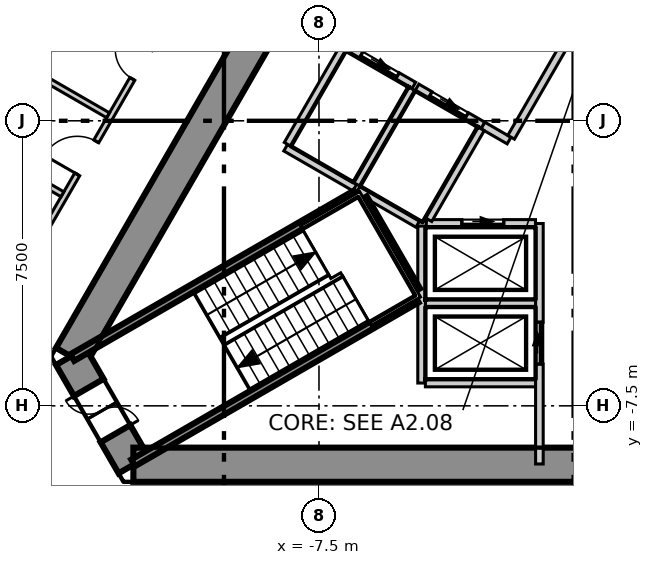
"""IFC4 building model, lengths in metres.
Left out: names, types, materials, properties, quantities, classifications, styles, units other than length and angle.
Written with IfcOpenShell. Run it as: python <this file> out.ifc"""

import sys

from ifc_helpers import new_model, si_unit, direction, frame, frame_2d, origin, place, context, subcontext, project, spatial, polyline, rectangle, outline, extrude, element, fill, save


model = new_model("IFC4")
c1 = context("Model", 3, precision=1e-05, world=origin(), true_north=direction((0.0, 1.0)))
c2 = subcontext(c1, "Body", "Model", "MODEL_VIEW")
j1 = project(units=[si_unit("LENGTHUNIT", "METRE"), si_unit("PLANEANGLEUNIT", "RADIAN")], contexts=[c1])
p1 = place(None, origin())
s1 = spatial("IfcSite", under=j1, at=p1, CompositionType="ELEMENT")
p2 = place(p1, origin())
s2 = spatial("IfcBuilding", under=s1, at=p2, CompositionType="ELEMENT")
p3 = place(p2, frame((0.0, 0.0, 35.3)))
s3 = spatial("IfcBuildingStorey", under=s2, at=p3, CompositionType="ELEMENT", Elevation=35.3)
p4 = place(p3, frame((-1.645, 15.25, -0.3), z_axis=(0.0, 0.0, 1.0), x_axis=(-0.500026485275, -0.866010111964, 0.0)))
e1 = element("IfcWall", 1, at=p4, inside=s3, PredefinedType="SHEAR", context=c2, shape_type="SweptSolid", body=[
    extrude(outline(polyline([(-0.26, -0.45), (1.685, -0.45), (3.63, -0.45), (5.576, -0.45), (7.521, -0.45), (9.466, -0.449), (11.411, -0.449), (13.357, -0.449), (15.302, -0.449), (17.247, -0.449), (19.192, -0.449), (21.138, -0.449), (23.083, -0.449), (25.028, -0.449), (24.509, 0.45), (22.644, 0.45), (20.778, 0.45), (18.913, 0.45), (17.048, 0.45), (15.182, 0.449), (13.317, 0.449), (11.452, 0.449), (9.587, 0.449), (7.721, 0.449), (5.856, 0.449), (3.991, 0.449), (2.125, 0.449), (0.26, 0.449), (-0.26, -0.45)])), origin(), (0.0, 0.0, 1.0), 4.0),
])
p5 = place(p4, frame((11.834, 0.0, 0.3)))
e2 = element("IfcOpeningElement", 2, at=p5, cuts=e1, PredefinedType="OPENING", context=c2, shape_type="SweptSolid", body=[
    extrude(rectangle(XDim=1.1, YDim=2.1, at=frame_2d((0.55, 1.05))), frame((0.0, 0.46, 0.0), z_axis=(0.0, -1.0, 0.0), x_axis=(1.0, 0.0, 0.0)), (0.0, 0.0, 1.0), 0.92),
])
p6 = place(p4, frame((4.842, 0.0, 0.3)))
e3 = element("IfcOpeningElement", 3, at=p6, cuts=e1, PredefinedType="OPENING", context=c2, shape_type="SweptSolid", body=[
    extrude(rectangle(XDim=1.0, YDim=2.1, at=frame_2d((0.5, 1.05))), frame((0.0, 0.46, 0.0), z_axis=(0.0, -1.0, 0.0), x_axis=(1.0, 0.0, 0.0)), (0.0, 0.0, 1.0), 0.92),
])
p7 = place(p3, frame((-14.03, -6.2, -0.3), z_axis=(0.0, 0.0, 1.0), x_axis=(0.500111984565, -0.865960739811, 0.0)))
e4 = element("IfcWall", 4, at=p7, inside=s3, PredefinedType="SHEAR", context=c2, shape_type="SweptSolid", body=[
    extrude(outline(polyline([(-0.26, -0.449), (1.646, -0.449), (3.551, -0.45), (3.032, 0.45), (1.646, 0.45), (0.26, 0.45), (-0.26, -0.449)])), origin(), (0.0, 0.0, 1.0), 4.0),
])
p8 = place(p7, frame((0.946, 0.0, 0.3)))
e5 = element("IfcOpeningElement", 5, at=p8, cuts=e4, PredefinedType="OPENING", context=c2, shape_type="SweptSolid", body=[
    extrude(rectangle(XDim=1.4, YDim=2.1, at=frame_2d((0.7, 1.05))), frame((0.0, 0.46, 0.0), z_axis=(0.0, -1.0, 0.0), x_axis=(1.0, 0.0, 0.0)), (0.0, 0.0, 1.0), 0.92),
])
p9 = place(p3, frame((-12.384, -9.05, -0.3), z_axis=(0.0, 0.0, 1.0), x_axis=(1.0, 0.0, 0.0)))
e6 = element("IfcWall", 6, at=p9, inside=s3, PredefinedType="SHEAR", context=c2, shape_type="SweptSolid", body=[
    extrude(outline(polyline([(-0.26, -0.45), (1.685, -0.45), (3.63, -0.45), (5.576, -0.45), (7.521, -0.45), (9.466, -0.45), (11.411, -0.45), (13.357, -0.45), (15.302, -0.45), (17.247, -0.45), (19.192, -0.45), (21.138, -0.45), (23.083, -0.45), (25.028, -0.45), (24.508, 0.45), (22.643, 0.45), (20.778, 0.45), (18.912, 0.45), (17.047, 0.45), (15.182, 0.45), (13.317, 0.45), (11.451, 0.45), (9.586, 0.45), (7.721, 0.45), (5.856, 0.45), (3.99, 0.45), (2.125, 0.45), (0.26, 0.45), (-0.26, -0.45)])), origin(), (0.0, 0.0, 1.0), 4.0),
])
p10 = place(p9, frame((16.648, 0.0, 0.3)))
e7 = element("IfcOpeningElement", 7, at=p10, cuts=e6, PredefinedType="OPENING", context=c2, shape_type="SweptSolid", body=[
    extrude(rectangle(XDim=0.9, YDim=2.1, at=frame_2d((0.45, 1.05))), frame((0.0, 0.46, 0.0), z_axis=(0.0, -1.0, 0.0), x_axis=(1.0, 0.0, 0.0)), (0.0, 0.0, 1.0), 0.92),
])
p11 = place(p3, frame((-3.462, 38.603, 0.0), z_axis=(0.0, 0.0, 1.0), x_axis=(-0.500012207976, -0.866018355391, 0.0)))
e8 = element("IfcWall", 8, at=p11, inside=s3, PredefinedType="ELEMENTEDWALL", context=c2, shape_type="SweptSolid", body=[
    extrude(rectangle(XDim=63.381, YDim=0.2, at=frame_2d((31.69, 0.0))), origin(), (0.0, 0.0, 1.0), 3.7),
])
p12 = place(p11, frame((2.302, 0.0, 0.9)))
e9 = element("IfcOpeningElement", 9, at=p12, cuts=e8, PredefinedType="OPENING", context=c2, shape_type="SweptSolid", body=[
    extrude(rectangle(XDim=5.6, YDim=2.5, at=frame_2d((2.8, 1.25))), frame((0.0, 0.11, 0.0), z_axis=(0.0, -1.0, 0.0), x_axis=(1.0, 0.0, 0.0)), (0.0, 0.0, 1.0), 0.22),
])
p13 = place(p11, frame((9.902, 0.0, 0.9)))
e10 = element("IfcOpeningElement", 10, at=p13, cuts=e8, PredefinedType="OPENING", context=c2, shape_type="SweptSolid", body=[
    extrude(rectangle(XDim=5.6, YDim=2.5, at=frame_2d((2.8, 1.25))), frame((0.0, 0.11, 0.0), z_axis=(0.0, -1.0, 0.0), x_axis=(1.0, 0.0, 0.0)), (0.0, 0.0, 1.0), 0.22),
])
p14 = place(p11, frame((17.501, 0.0, 0.9)))
e11 = element("IfcOpeningElement", 11, at=p14, cuts=e8, PredefinedType="OPENING", context=c2, shape_type="SweptSolid", body=[
    extrude(rectangle(XDim=5.6, YDim=2.5, at=frame_2d((2.8, 1.25))), frame((0.0, 0.11, 0.0), z_axis=(0.0, -1.0, 0.0), x_axis=(1.0, 0.0, 0.0)), (0.0, 0.0, 1.0), 0.22),
])
p15 = place(p11, frame((25.1, 0.0, 0.9)))
e12 = element("IfcOpeningElement", 12, at=p15, cuts=e8, PredefinedType="OPENING", context=c2, shape_type="SweptSolid", body=[
    extrude(rectangle(XDim=5.6, YDim=2.5, at=frame_2d((2.8, 1.25))), frame((0.0, 0.11, 0.0), z_axis=(0.0, -1.0, 0.0), x_axis=(1.0, 0.0, 0.0)), (0.0, 0.0, 1.0), 0.22),
])
p16 = place(p11, frame((32.7, 0.0, 0.9)))
e13 = element("IfcOpeningElement", 13, at=p16, cuts=e8, PredefinedType="OPENING", context=c2, shape_type="SweptSolid", body=[
    extrude(rectangle(XDim=5.6, YDim=2.5, at=frame_2d((2.8, 1.25))), frame((0.0, 0.11, 0.0), z_axis=(0.0, -1.0, 0.0), x_axis=(1.0, 0.0, 0.0)), (0.0, 0.0, 1.0), 0.22),
])
p17 = place(p11, frame((40.299, 0.0, 0.9)))
e14 = element("IfcOpeningElement", 14, at=p17, cuts=e8, PredefinedType="OPENING", context=c2, shape_type="SweptSolid", body=[
    extrude(rectangle(XDim=5.6, YDim=2.5, at=frame_2d((2.8, 1.25))), frame((0.0, 0.11, 0.0), z_axis=(0.0, -1.0, 0.0), x_axis=(1.0, 0.0, 0.0)), (0.0, 0.0, 1.0), 0.22),
])
p18 = place(p11, frame((47.899, 0.0, 0.9)))
e15 = element("IfcOpeningElement", 15, at=p18, cuts=e8, PredefinedType="OPENING", context=c2, shape_type="SweptSolid", body=[
    extrude(rectangle(XDim=5.6, YDim=2.5, at=frame_2d((2.8, 1.25))), frame((0.0, 0.11, 0.0), z_axis=(0.0, -1.0, 0.0), x_axis=(1.0, 0.0, 0.0)), (0.0, 0.0, 1.0), 0.22),
])
p19 = place(p11, frame((55.498, 0.0, 0.9)))
e16 = element("IfcOpeningElement", 16, at=p19, cuts=e8, PredefinedType="OPENING", context=c2, shape_type="SweptSolid", body=[
    extrude(rectangle(XDim=5.6, YDim=2.5, at=frame_2d((2.8, 1.25))), frame((0.0, 0.11, 0.0), z_axis=(0.0, -1.0, 0.0), x_axis=(1.0, 0.0, 0.0)), (0.0, 0.0, 1.0), 0.22),
])
p20 = place(p3, frame((-19.497, -11.17, 0.0), z_axis=(0.0, 0.0, 1.0), x_axis=(0.499998854553, 0.866026065108, 0.0)))
e17 = element("IfcWall", 17, at=p20, inside=s3, PredefinedType="PARTITIONING", context=c2, shape_type="SweptSolid", body=[
    extrude(rectangle(XDim=38.994, YDim=0.15, at=frame_2d((19.497, 0.0))), origin(), (0.0, 0.0, 1.0), 3.7),
])
p21 = place(p20, frame((36.244, 0.0, 0.0)))
e18 = element("IfcOpeningElement", 18, at=p21, cuts=e17, PredefinedType="OPENING", context=c2, shape_type="SweptSolid", body=[
    extrude(rectangle(XDim=1.1, YDim=2.1, at=frame_2d((0.55, 1.05))), frame((0.0, 0.085, 0.0), z_axis=(0.0, -1.0, 0.0), x_axis=(1.0, 0.0, 0.0)), (0.0, 0.0, 1.0), 0.17),
])
p22 = place(p20, frame((29.171, 0.0, 0.0)))
e19 = element("IfcOpeningElement", 19, at=p22, cuts=e17, PredefinedType="OPENING", context=c2, shape_type="SweptSolid", body=[
    extrude(rectangle(XDim=1.0, YDim=2.1, at=frame_2d((0.5, 1.05))), frame((0.0, 0.085, 0.0), z_axis=(0.0, -1.0, 0.0), x_axis=(1.0, 0.0, 0.0)), (0.0, 0.0, 1.0), 0.17),
])
p23 = place(p20, frame((32.971, 0.0, 0.0)))
e20 = element("IfcOpeningElement", 20, at=p23, cuts=e17, PredefinedType="OPENING", context=c2, shape_type="SweptSolid", body=[
    extrude(rectangle(XDim=0.9, YDim=2.1, at=frame_2d((0.45, 1.05))), frame((0.0, 0.085, 0.0), z_axis=(0.0, -1.0, 0.0), x_axis=(1.0, 0.0, 0.0)), (0.0, 0.0, 1.0), 0.17),
])
p24 = place(p20, frame((22.771, 0.0, 0.0)))
e21 = element("IfcOpeningElement", 21, at=p24, cuts=e17, PredefinedType="OPENING", context=c2, shape_type="SweptSolid", body=[
    extrude(rectangle(XDim=1.0, YDim=2.1, at=frame_2d((0.5, 1.05))), frame((0.0, 0.085, 0.0), z_axis=(0.0, -1.0, 0.0), x_axis=(1.0, 0.0, 0.0)), (0.0, 0.0, 1.0), 0.17),
])
p25 = place(p20, frame((6.872, 0.0, 0.0)))
e22 = element("IfcOpeningElement", 22, at=p25, cuts=e17, PredefinedType="OPENING", context=c2, shape_type="SweptSolid", body=[
    extrude(rectangle(XDim=1.1, YDim=2.1, at=frame_2d((0.55, 1.05))), frame((0.0, 0.085, 0.0), z_axis=(0.0, -1.0, 0.0), x_axis=(1.0, 0.0, 0.0)), (0.0, 0.0, 1.0), 0.17),
])
p26 = place(p20, frame((17.372, 0.0, 0.0)))
e23 = element("IfcOpeningElement", 23, at=p26, cuts=e17, PredefinedType="OPENING", context=c2, shape_type="SweptSolid", body=[
    extrude(rectangle(XDim=0.9, YDim=2.1, at=frame_2d((0.45, 1.05))), frame((0.0, 0.085, 0.0), z_axis=(0.0, -1.0, 0.0), x_axis=(1.0, 0.0, 0.0)), (0.0, 0.0, 1.0), 0.17),
])
p27 = place(p20, frame((14.172, 0.0, 0.0)))
e24 = element("IfcOpeningElement", 24, at=p27, cuts=e17, PredefinedType="OPENING", context=c2, shape_type="SweptSolid", body=[
    extrude(rectangle(XDim=0.9, YDim=2.1, at=frame_2d((0.45, 1.05))), frame((0.0, 0.085, 0.0), z_axis=(0.0, -1.0, 0.0), x_axis=(1.0, 0.0, 0.0)), (0.0, 0.0, 1.0), 0.17),
])
p28 = place(p20, frame((11.272, 0.0, 0.0)))
e25 = element("IfcOpeningElement", 25, at=p28, cuts=e17, PredefinedType="OPENING", context=c2, shape_type="SweptSolid", body=[
    extrude(rectangle(XDim=1.0, YDim=2.1, at=frame_2d((0.5, 1.05))), frame((0.0, 0.085, 0.0), z_axis=(0.0, -1.0, 0.0), x_axis=(1.0, 0.0, 0.0)), (0.0, 0.0, 1.0), 0.17),
])
p29 = place(p20, frame((1.473, 0.0, 0.0)))
e26 = element("IfcOpeningElement", 26, at=p29, cuts=e17, PredefinedType="OPENING", context=c2, shape_type="SweptSolid", body=[
    extrude(rectangle(XDim=1.1, YDim=2.1, at=frame_2d((0.55, 1.05))), frame((0.0, 0.085, 0.0), z_axis=(0.0, -1.0, 0.0), x_axis=(1.0, 0.0, 0.0)), (0.0, 0.0, 1.0), 0.17),
])
p30 = place(p3, frame((-17.304, -0.171, 0.0), z_axis=(0.0, 0.0, 1.0), x_axis=(0.500054279689, 0.865994063124, 0.0)))
e27 = element("IfcWall", 27, at=p30, inside=s3, PredefinedType="PARTITIONING", context=c2, shape_type="SweptSolid", body=[
    extrude(rectangle(XDim=8.725, YDim=0.15, at=frame_2d((4.363, 0.0))), origin(), (0.0, 0.0, 1.0), 3.7),
])
for number, where, z_axis, x_axis in (
    (28, (-17.239, -0.208, 0.0), (0.0, 0.0, 1.0), (0.866, -0.5, 0.0)),
    (29, (-16.039, 1.87, 0.0), (0.0, 0.0, 1.0), (0.866, -0.5, 0.0)),
):
    element("IfcWall", number, at=place(p3, frame(where, z_axis=z_axis, x_axis=x_axis)), inside=s3, PredefinedType="PARTITIONING", context=c2, shape_type="SweptSolid", body=[
        extrude(rectangle(XDim=3.45, YDim=0.15, at=frame_2d((1.725, 0.0))), origin(), (0.0, 0.0, 1.0), 3.7),
    ])
p31 = place(p3, frame((-8.376, -0.707, 0.0), z_axis=(0.0, 0.0, 1.0), x_axis=(0.866067520717, -0.499927044236, 0.0)))
e30 = element("IfcWall", 30, at=p31, inside=s3, PredefinedType="SOLIDWALL", context=c2, shape_type="SweptSolid", body=[
    extrude(rectangle(XDim=2.1, YDim=0.2, at=frame_2d((1.05, 0.0))), origin(), (0.0, 0.0, 1.0), 3.7),
])
p32 = place(p3, frame((-8.326, -0.62, 0.0), z_axis=(0.0, 0.0, 1.0), x_axis=(0.500023687443, 0.866011727401, 0.0)))
e31 = element("IfcWall", 31, at=p32, inside=s3, PredefinedType="SOLIDWALL", context=c2, shape_type="SweptSolid", body=[
    extrude(rectangle(XDim=2.9, YDim=0.2, at=frame_2d((1.45, 0.0))), origin(), (0.0, 0.0, 1.0), 3.7),
])
p33 = place(p3, frame((-4.7, -4.8, 0.0), z_axis=(0.0, 0.0, 1.0), x_axis=(1.0, 0.0, 0.0)))
e32 = element("IfcWall", 32, at=p33, inside=s3, PredefinedType="SOLIDWALL", context=c2, shape_type="SweptSolid", body=[
    extrude(rectangle(XDim=2.9, YDim=0.2, at=frame_2d((1.45, 0.0))), origin(), (0.0, 0.0, 1.0), 3.7),
])
p34 = place(p3, frame((-4.8, -6.9, 0.0), z_axis=(0.0, 0.0, 1.0), x_axis=(0.0, 1.0, 0.0)))
e33 = element("IfcWall", 33, at=p34, inside=s3, PredefinedType="SOLIDWALL", context=c2, shape_type="SweptSolid", body=[
    extrude(rectangle(XDim=4.131, YDim=0.2, at=frame_2d((2.065, 0.0))), origin(), (0.0, 0.0, 1.0), 3.7),
])
p35 = place(p3, frame((-4.7, -6.9, 0.0), z_axis=(0.0, 0.0, 1.0), x_axis=(1.0, 0.0, 0.0)))
e34 = element("IfcWall", 34, at=p35, inside=s3, PredefinedType="SOLIDWALL", context=c2, shape_type="SweptSolid", body=[
    extrude(rectangle(XDim=2.9, YDim=0.2, at=frame_2d((1.45, 0.0))), origin(), (0.0, 0.0, 1.0), 3.7),
])
p36 = place(p3, frame((-1.7, -9.03, 0.0), z_axis=(0.0, 0.0, 1.0), x_axis=(0.0, 1.0, 0.0)))
e35 = element("IfcWall", 35, at=p36, inside=s3, PredefinedType="SOLIDWALL", context=c2, shape_type="SweptSolid", body=[
    extrude(rectangle(XDim=6.327, YDim=0.2, at=frame_2d((3.164, 0.0))), origin(), (0.0, 0.0, 1.0), 3.7),
])
p37 = place(p36, frame((2.63, 0.0, 0.0)))
e36 = element("IfcOpeningElement", 36, at=p37, cuts=e35, PredefinedType="OPENING", context=c2, shape_type="SweptSolid", body=[
    extrude(rectangle(XDim=1.1, YDim=2.1, at=frame_2d((0.55, 1.05))), frame((0.0, 0.11, 0.0), z_axis=(0.0, -1.0, 0.0), x_axis=(1.0, 0.0, 0.0)), (0.0, 0.0, 1.0), 0.22),
])
p38 = place(p3, frame((-4.676, -2.7, 0.0), z_axis=(0.0, 0.0, 1.0), x_axis=(1.0, 0.0, 0.0)))
e37 = element("IfcWall", 37, at=p38, inside=s3, PredefinedType="SOLIDWALL", context=c2, shape_type="SweptSolid", body=[
    extrude(rectangle(XDim=2.873, YDim=0.2, at=frame_2d((1.437, 0.0))), origin(), (0.0, 0.0, 1.0), 3.7),
])
p39 = place(p38, frame((0.937, 0.0, 0.0)))
e38 = element("IfcOpeningElement", 38, at=p39, cuts=e37, PredefinedType="OPENING", context=c2, shape_type="SweptSolid", body=[
    extrude(rectangle(XDim=1.1, YDim=2.1, at=frame_2d((0.55, 1.05))), frame((0.0, 0.11, 0.0), z_axis=(0.0, -1.0, 0.0), x_axis=(1.0, 0.0, 0.0)), (0.0, 0.0, 1.0), 0.22),
])
p40 = place(p3, frame((-8.67, 3.043, 0.0), z_axis=(0.0, 0.0, 1.0), x_axis=(0.866029956157, -0.499992114976, 0.0)))
e39 = element("IfcWall", 39, at=p40, inside=s3, PredefinedType="SOLIDWALL", context=c2, shape_type="SweptSolid", body=[
    extrude(rectangle(XDim=4.232, YDim=0.2, at=frame_2d((2.116, 0.0))), origin(), (0.0, 0.0, 1.0), 3.7),
])
p41 = place(p40, frame((2.63, 0.0, 0.0)))
e40 = element("IfcOpeningElement", 40, at=p41, cuts=e39, PredefinedType="OPENING", context=c2, shape_type="SweptSolid", body=[
    extrude(rectangle(XDim=1.1, YDim=2.1, at=frame_2d((0.55, 1.05))), frame((0.0, 0.11, 0.0), z_axis=(0.0, -1.0, 0.0), x_axis=(1.0, 0.0, 0.0)), (0.0, 0.0, 1.0), 0.22),
])
p42 = place(p3, frame((-3.188, -0.122, 0.0), z_axis=(0.0, 0.0, 1.0), x_axis=(0.865705793592, -0.50055317294, 0.0)))
e41 = element("IfcWall", 41, at=p42, inside=s3, PredefinedType="SOLIDWALL", context=c2, shape_type="SweptSolid", body=[
    extrude(rectangle(XDim=0.797, YDim=0.2, at=frame_2d((0.398, 0.0))), origin(), (0.0, 0.0, 1.0), 3.7),
])
p43 = place(p3, frame((-2.444, -0.433, 0.0), z_axis=(0.0, 0.0, 1.0), x_axis=(0.500035624827, 0.866004834804, 0.0)))
e42 = element("IfcWall", 42, at=p43, inside=s3, PredefinedType="SOLIDWALL", context=c2, shape_type="SweptSolid", body=[
    extrude(rectangle(XDim=3.194, YDim=0.2, at=frame_2d((1.597, 0.0))), origin(), (0.0, 0.0, 1.0), 3.7),
])
p44 = place(p3, frame((-6.507, -1.67, 0.0), z_axis=(0.0, 0.0, 1.0), x_axis=(0.50012328804, 0.865954211699, 0.0)))
e43 = element("IfcWall", 43, at=p44, inside=s3, PredefinedType="SOLIDWALL", context=c2, shape_type="SweptSolid", body=[
    extrude(rectangle(XDim=2.9, YDim=0.2, at=frame_2d((1.45, 0.0))), origin(), (0.0, 0.0, 1.0), 3.7),
])
p45 = place(p3, frame((-6.47, -1.807, 0.0), z_axis=(0.0, 0.0, 1.0), x_axis=(0.865883195159, -0.500246231712, 0.0)))
e44 = element("IfcWall", 44, at=p45, inside=s3, PredefinedType="SOLIDWALL", context=c2, shape_type="SweptSolid", body=[
    extrude(rectangle(XDim=1.815, YDim=0.2, at=frame_2d((0.908, 0.0))), origin(), (0.0, 0.0, 1.0), 3.7),
])
p46 = place(p3, frame((-4.922, 0.879, 0.0), z_axis=(0.0, 0.0, 1.0), x_axis=(0.866073918653, -0.499915960366, 0.0)))
e45 = element("IfcWall", 45, at=p46, inside=s3, PredefinedType="SOLIDWALL", context=c2, shape_type="SweptSolid", body=[
    extrude(rectangle(XDim=2.002, YDim=0.2, at=frame_2d((1.001, 0.0))), origin(), (0.0, 0.0, 1.0), 3.7),
])
p47 = place(p46, frame((0.402, 0.0, 0.0)))
e46 = element("IfcOpeningElement", 46, at=p47, cuts=e45, PredefinedType="OPENING", context=c2, shape_type="SweptSolid", body=[
    extrude(rectangle(XDim=1.1, YDim=2.1, at=frame_2d((0.55, 1.05))), frame((0.0, 0.11, 0.0), z_axis=(0.0, -1.0, 0.0), x_axis=(1.0, 0.0, 0.0)), (0.0, 0.0, 1.0), 0.22),
])
p48 = place(p3, frame((-4.619, -2.6, 0.0), z_axis=(0.0, 0.0, 1.0), x_axis=(0.50009492287, 0.865970593103, 0.0)))
e47 = element("IfcWall", 47, at=p48, inside=s3, PredefinedType="SOLIDWALL", context=c2, shape_type="SweptSolid", body=[
    extrude(rectangle(XDim=2.761, YDim=0.2, at=frame_2d((1.381, 0.0))), origin(), (0.0, 0.0, 1.0), 3.7),
])
p49 = place(p3, frame((-13.99, -6.229, 0.0), z_axis=(0.0, 0.0, 1.0), x_axis=(0.866060059011, 0.499939970583, 0.0)))
e48 = element("IfcWall", 48, at=p49, inside=s3, PredefinedType="SOLIDWALL", context=c2, shape_type="SweptSolid", body=[
    extrude(rectangle(XDim=8.615, YDim=0.2, at=frame_2d((4.307, 0.0))), origin(), (0.0, 0.0, 1.0), 3.7),
])
p50 = place(p3, frame((-6.329, -2.038, 0.0), z_axis=(0.0, 0.0, 1.0), x_axis=(0.500200581029, -0.865909567298, 0.0)))
e49 = element("IfcWall", 49, at=p50, inside=s3, PredefinedType="SOLIDWALL", context=c2, shape_type="SweptSolid", body=[
    extrude(rectangle(XDim=2.799, YDim=0.2, at=frame_2d((1.399, 0.0))), origin(), (0.0, 0.0, 1.0), 3.7),
])
p51 = place(p3, frame((-12.39, -9.001, 0.0), z_axis=(0.0, 0.0, 1.0), x_axis=(0.866010975815, 0.500024989144, 0.0)))
e50 = element("IfcWall", 50, at=p51, inside=s3, PredefinedType="SOLIDWALL", context=c2, shape_type="SweptSolid", body=[
    extrude(rectangle(XDim=8.615, YDim=0.2, at=frame_2d((4.308, 0.0))), origin(), (0.0, 0.0, 1.0), 3.7),
])
p52 = place(p39, origin())
e51 = element("IfcDoor", 51, at=p52, inside=s3, OperationType="SLIDING_TO_LEFT", PredefinedType="DOOR", context=c2, shape_type="SweptSolid", body=[
    extrude(rectangle(XDim=1.1, YDim=2.1, at=frame_2d((0.55, 1.05))), frame((0.0, 0.025, 0.0), z_axis=(0.0, -1.0, 0.0), x_axis=(1.0, 0.0, 0.0)), (0.0, 0.0, 1.0), 0.05),
])
fill(e38, e51)
p53 = place(p37, origin())
e52 = element("IfcDoor", 52, at=p53, inside=s3, OperationType="SLIDING_TO_LEFT", PredefinedType="DOOR", context=c2, shape_type="SweptSolid", body=[
    extrude(rectangle(XDim=1.1, YDim=2.1, at=frame_2d((0.55, 1.05))), frame((0.0, 0.025, 0.0), z_axis=(0.0, -1.0, 0.0), x_axis=(1.0, 0.0, 0.0)), (0.0, 0.0, 1.0), 0.05),
])
fill(e36, e52)
p54 = place(p47, origin())
e53 = element("IfcDoor", 53, at=p54, inside=s3, OperationType="SLIDING_TO_LEFT", PredefinedType="DOOR", context=c2, shape_type="SweptSolid", body=[
    extrude(rectangle(XDim=1.1, YDim=2.1, at=frame_2d((0.55, 1.05))), frame((0.0, 0.025, 0.0), z_axis=(0.0, -1.0, 0.0), x_axis=(1.0, 0.0, 0.0)), (0.0, 0.0, 1.0), 0.05),
])
fill(e46, e53)
p55 = place(p41, origin())
e54 = element("IfcDoor", 54, at=p55, inside=s3, OperationType="SLIDING_TO_LEFT", PredefinedType="DOOR", context=c2, shape_type="SweptSolid", body=[
    extrude(rectangle(XDim=1.1, YDim=2.1, at=frame_2d((0.55, 1.05))), frame((0.0, 0.025, 0.0), z_axis=(0.0, -1.0, 0.0), x_axis=(1.0, 0.0, 0.0)), (0.0, 0.0, 1.0), 0.05),
])
fill(e40, e54)
p56 = place(p27, origin())
e55 = element("IfcDoor", 55, at=p56, inside=s3, OperationType="SINGLE_SWING_LEFT", PredefinedType="DOOR", context=c2, shape_type="SweptSolid", body=[
    extrude(rectangle(XDim=0.9, YDim=2.1, at=frame_2d((0.45, 1.05))), frame((0.0, 0.025, 0.0), z_axis=(0.0, -1.0, 0.0), x_axis=(1.0, 0.0, 0.0)), (0.0, 0.0, 1.0), 0.05),
])
fill(e24, e55)
p57 = place(p28, origin())
e56 = element("IfcDoor", 56, at=p57, inside=s3, OperationType="SINGLE_SWING_RIGHT", PredefinedType="DOOR", context=c2, shape_type="SweptSolid", body=[
    extrude(rectangle(XDim=1.0, YDim=2.1, at=frame_2d((0.5, 1.05))), frame((0.0, 0.025, 0.0), z_axis=(0.0, -1.0, 0.0), x_axis=(1.0, 0.0, 0.0)), (0.0, 0.0, 1.0), 0.05),
])
fill(e25, e56)
p58 = place(p8, origin())
e57 = element("IfcDoor", 57, at=p58, inside=s3, OperationType="DOUBLE_DOOR_SINGLE_SWING", PredefinedType="DOOR", context=c2, shape_type="SweptSolid", body=[
    extrude(rectangle(XDim=1.4, YDim=2.1, at=frame_2d((0.7, 1.05))), frame((0.0, 0.025, 0.0), z_axis=(0.0, -1.0, 0.0), x_axis=(1.0, 0.0, 0.0)), (0.0, 0.0, 1.0), 0.05),
])
fill(e5, e57)
save(model, sys.argv[1])
